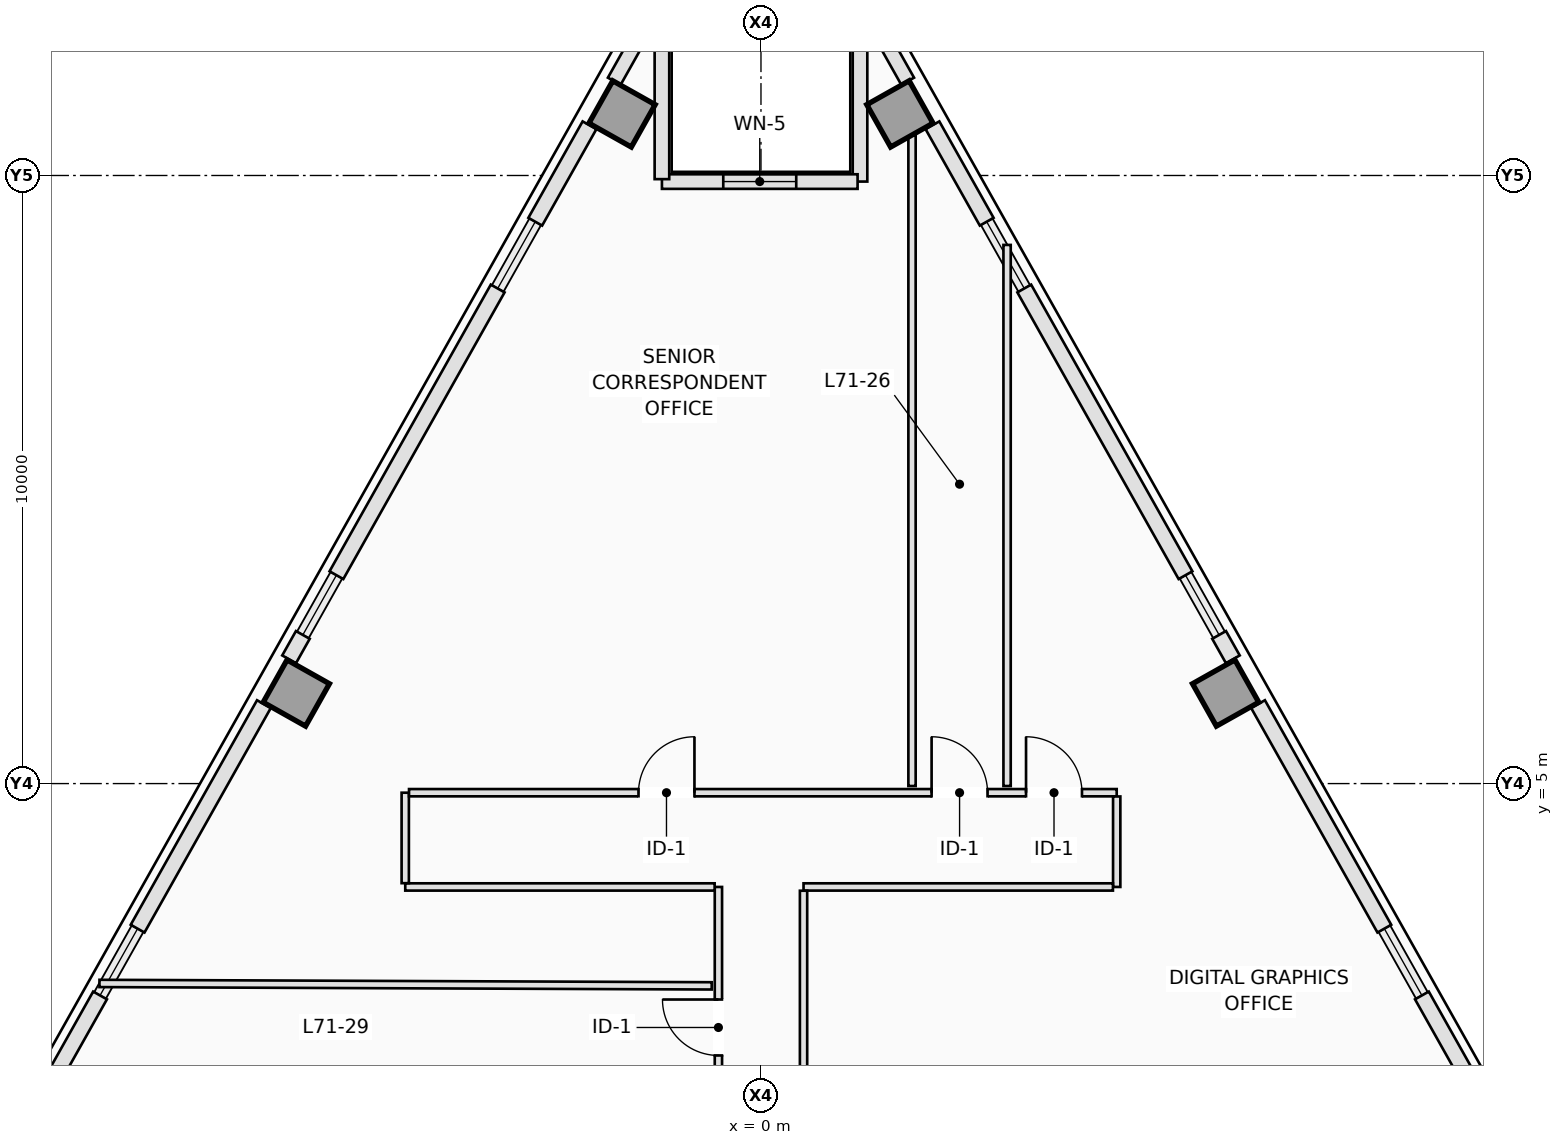
"""IFC4 building model, lengths in metres.
Left out: names, types, materials, properties, quantities, classifications, styles, units other than length and angle.
Written with IfcOpenShell. Run it as: python <this file> out.ifc"""

import sys

from ifc_helpers import new_model, si_unit, direction, frame, frame_2d, origin, origin_2d, place, context, subcontext, project, spatial, rectangle, extrude, element, fill, save


model = new_model("IFC4")
c1 = context("Model", 3, precision=1e-05, world=origin(), true_north=direction((0.0, 1.0)))
c2 = subcontext(c1, "Body", "Model", "MODEL_VIEW")
j1 = project(units=[si_unit("LENGTHUNIT", "METRE"), si_unit("PLANEANGLEUNIT", "RADIAN")], contexts=[c1])
p1 = place(None, origin())
s1 = spatial("IfcSite", under=j1, at=p1, CompositionType="ELEMENT")
p2 = place(p1, origin())
s2 = spatial("IfcBuilding", under=s1, at=p2, CompositionType="ELEMENT")
p3 = place(p2, frame((0.0, 0.0, 256.9)))
s3 = spatial("IfcBuildingStorey", under=s2, at=p3, CompositionType="ELEMENT", Elevation=256.9)
for number, where, z_axis, x_axis in (
    (1, (7.642, 6.489, 0.0), (0.0, 0.0, 1.0), (0.872, 0.49, 0.0)),
    (2, (2.285, 16.012, 0.0), (0.0, 0.0, 1.0), (0.872, 0.49, 0.0)),
    (3, (-2.285, 16.012, 0.0), (0.0, 0.0, 1.0), (-0.872, 0.49, 0.0)),
    (4, (-7.642, 6.489, 0.0), (0.0, 0.0, 1.0), (-0.872, 0.49, 0.0)),
):
    element("IfcColumn", number, at=place(p3, frame(where, z_axis=z_axis, x_axis=x_axis)), inside=s3, PredefinedType="COLUMN", context=c2, shape_type="SweptSolid", body=[
        extrude(rectangle(XDim=0.8, YDim=0.8, at=origin_2d()), origin(), (0.0, 0.0, 1.0), 3.5),
    ])
p4 = place(p3, frame((1.95, 17.373, 0.0), z_axis=(0.0, 0.0, 1.0), x_axis=(0.490199895283, -0.871610040479, 0.0)))
e5 = element("IfcWall", 5, at=p4, inside=s3, PredefinedType="STANDARD", context=c2, shape_type="SweptSolid", body=[
    extrude(rectangle(XDim=0.945, YDim=0.24, at=frame_2d((0.472, 0.0))), origin(), (0.0, 0.0, 1.0), 3.25),
])
p5 = place(p3, frame((2.82, 15.826, 0.0), z_axis=(0.0, 0.0, 1.0), x_axis=(0.490261239633, -0.871575537125, 0.0)))
e6 = element("IfcWall", 6, at=p5, inside=s3, PredefinedType="STANDARD", context=c2, shape_type="SweptSolid", body=[
    extrude(rectangle(XDim=1.82, YDim=0.26, at=frame_2d((0.91, 0.0))), origin(), (0.0, 0.0, 1.0), 3.25),
])
p6 = place(p3, frame((4.33, 13.142, 0.0), z_axis=(0.0, 0.0, 1.0), x_axis=(0.490265525523, -0.871573126297, 0.0)))
e7 = element("IfcWall", 7, at=p6, inside=s3, PredefinedType="STANDARD", context=c2, shape_type="SweptSolid", body=[
    extrude(rectangle(XDim=5.409, YDim=0.26, at=frame_2d((2.705, 0.0))), origin(), (0.0, 0.0, 1.0), 3.25),
])
p7 = place(p3, frame((7.534, 7.445, 0.0), z_axis=(0.0, 0.0, 1.0), x_axis=(0.490412424957, -0.871490478116, 0.0)))
e8 = element("IfcWall", 8, at=p7, inside=s3, PredefinedType="STANDARD", context=c2, shape_type="SweptSolid", body=[
    extrude(rectangle(XDim=0.46, YDim=0.26, at=frame_2d((0.23, 0.0))), origin(), (0.0, 0.0, 1.0), 3.25),
])
p8 = place(p3, frame((8.174, 6.307, 0.0), z_axis=(0.0, 0.0, 1.0), x_axis=(0.490269447258, -0.871570920284, 0.0)))
e9 = element("IfcWall", 9, at=p8, inside=s3, PredefinedType="STANDARD", context=c2, shape_type="SweptSolid", body=[
    extrude(rectangle(XDim=4.237, YDim=0.26, at=frame_2d((2.118, 0.0))), origin(), (0.0, 0.0, 1.0), 3.25),
])
p9 = place(p3, frame((10.869, 1.516, 0.0), z_axis=(0.0, 0.0, 1.0), x_axis=(0.490244825075, -0.871584770109, 0.0)))
e10 = element("IfcWall", 10, at=p9, inside=s3, PredefinedType="STANDARD", context=c2, shape_type="SweptSolid", body=[
    extrude(rectangle(XDim=4.237, YDim=0.26, at=frame_2d((2.119, 0.0))), origin(), (0.0, 0.0, 1.0), 3.25),
])
p10 = place(p3, frame((-2.413, 16.549, 0.0), z_axis=(0.0, 0.0, 1.0), x_axis=(0.490199895283, 0.871610040479, 0.0)))
e11 = element("IfcWall", 11, at=p10, inside=s3, PredefinedType="STANDARD", context=c2, shape_type="SweptSolid", body=[
    extrude(rectangle(XDim=0.945, YDim=0.24, at=frame_2d((0.472, 0.0))), origin(), (0.0, 0.0, 1.0), 3.25),
])
p11 = place(p3, frame((-7.76, 7.044, 0.0), z_axis=(0.0, 0.0, 1.0), x_axis=(0.490412424957, 0.871490478116, 0.0)))
e12 = element("IfcWall", 12, at=p11, inside=s3, PredefinedType="STANDARD", context=c2, shape_type="SweptSolid", body=[
    extrude(rectangle(XDim=0.46, YDim=0.26, at=frame_2d((0.23, 0.0))), origin(), (0.0, 0.0, 1.0), 3.25),
])
p12 = place(p3, frame((-6.982, 8.427, 0.0), z_axis=(0.0, 0.0, 1.0), x_axis=(0.490265525523, 0.871573126297, 0.0)))
e13 = element("IfcWall", 13, at=p12, inside=s3, PredefinedType="STANDARD", context=c2, shape_type="SweptSolid", body=[
    extrude(rectangle(XDim=5.409, YDim=0.26, at=frame_2d((2.705, 0.0))), origin(), (0.0, 0.0, 1.0), 3.25),
])
p13 = place(p3, frame((-3.712, 14.24, 0.0), z_axis=(0.0, 0.0, 1.0), x_axis=(0.490261239633, 0.871575537125, 0.0)))
e14 = element("IfcWall", 14, at=p13, inside=s3, PredefinedType="STANDARD", context=c2, shape_type="SweptSolid", body=[
    extrude(rectangle(XDim=1.82, YDim=0.26, at=frame_2d((0.91, 0.0))), origin(), (0.0, 0.0, 1.0), 3.25),
])
p14 = place(p3, frame((-12.946, -2.177, 0.0), z_axis=(0.0, 0.0, 1.0), x_axis=(0.490244825075, 0.871584770109, 0.0)))
e15 = element("IfcWall", 15, at=p14, inside=s3, PredefinedType="STANDARD", context=c2, shape_type="SweptSolid", body=[
    extrude(rectangle(XDim=4.237, YDim=0.26, at=frame_2d((2.119, 0.0))), origin(), (0.0, 0.0, 1.0), 3.25),
])
p15 = place(p3, frame((-10.251, 2.615, 0.0), z_axis=(0.0, 0.0, 1.0), x_axis=(0.490269447258, 0.871570920284, 0.0)))
e16 = element("IfcWall", 16, at=p15, inside=s3, PredefinedType="STANDARD", context=c2, shape_type="SweptSolid", body=[
    extrude(rectangle(XDim=4.237, YDim=0.26, at=frame_2d((2.118, 0.0))), origin(), (0.0, 0.0, 1.0), 3.25),
])
p16 = place(p3, frame((1.629, 17.4, 0.0), z_axis=(0.0, 0.0, 1.0), x_axis=(0.0, -1.0, 0.0)))
e17 = element("IfcWall", 17, at=p16, inside=s3, PredefinedType="STANDARD", context=c2, shape_type="SweptSolid", body=[
    extrude(rectangle(XDim=2.5, YDim=0.24, at=frame_2d((1.25, 0.0))), origin(), (0.0, 0.0, 1.0), 3.25),
])
p17 = place(p3, frame((1.589, 14.9, 0.0), z_axis=(0.0, 0.0, 1.0), x_axis=(-1.0, 0.0, 0.0)))
e18 = element("IfcWall", 18, at=p17, inside=s3, PredefinedType="STANDARD", context=c2, shape_type="SweptSolid", body=[
    extrude(rectangle(XDim=3.218, YDim=0.24, at=frame_2d((1.609, 0.0))), origin(), (0.0, 0.0, 1.0), 3.25),
])
p18 = place(p17, frame((1.009, 0.0, 0.9)))
e19 = element("IfcOpeningElement", 19, at=p18, cuts=e18, PredefinedType="OPENING", context=c2, shape_type="SweptSolid", body=[
    extrude(rectangle(XDim=1.2, YDim=1.8, at=frame_2d((0.6, 0.9))), frame((0.0, 0.13, 0.0), z_axis=(0.0, -1.0, 0.0), x_axis=(1.0, 0.0, 0.0)), (0.0, 0.0, 1.0), 0.26),
])
p19 = place(p3, frame((-1.629, 14.94, 0.0), z_axis=(0.0, 0.0, 1.0), x_axis=(0.0, 1.0, 0.0)))
e20 = element("IfcWall", 20, at=p19, inside=s3, PredefinedType="STANDARD", context=c2, shape_type="SweptSolid", body=[
    extrude(rectangle(XDim=2.46, YDim=0.24, at=frame_2d((1.23, 0.0))), origin(), (0.0, 0.0, 1.0), 3.25),
])
p20 = place(p3, frame((-0.7, -2.668, 0.0), z_axis=(0.0, 0.0, 1.0), x_axis=(0.0, 1.0, 0.0)))
e21 = element("IfcWall", 21, at=p20, inside=s3, PredefinedType="PARTITIONING", context=c2, shape_type="SweptSolid", body=[
    extrude(rectangle(XDim=5.968, YDim=0.12, at=frame_2d((2.984, 0.0))), origin(), (0.0, 0.0, 1.0), 3.25),
])
p21 = place(p20, frame((3.197, 0.0, 0.0)))
e22 = element("IfcOpeningElement", 22, at=p21, cuts=e21, PredefinedType="OPENING", context=c2, shape_type="SweptSolid", body=[
    extrude(rectangle(XDim=0.92, YDim=2.12, at=frame_2d((0.46, 1.06))), frame((0.0, 0.07, 0.0), z_axis=(0.0, -1.0, 0.0), x_axis=(1.0, 0.0, 0.0)), (0.0, 0.0, 1.0), 0.14),
])
p22 = place(p3, frame((-0.762, 3.3, 0.0), z_axis=(0.0, 0.0, 1.0), x_axis=(-1.0, 0.0, 0.0)))
e23 = element("IfcWall", 23, at=p22, inside=s3, PredefinedType="PARTITIONING", context=c2, shape_type="SweptSolid", body=[
    extrude(rectangle(XDim=5.088, YDim=0.12, at=frame_2d((2.544, 0.0))), origin(), (0.0, 0.0, 1.0), 3.25),
])
p23 = place(p3, frame((-5.85, 3.362, 0.0), z_axis=(0.0, 0.0, 1.0), x_axis=(0.0, 1.0, 0.0)))
e24 = element("IfcWall", 24, at=p23, inside=s3, PredefinedType="PARTITIONING", context=c2, shape_type="SweptSolid", body=[
    extrude(rectangle(XDim=1.488, YDim=0.12, at=frame_2d((0.744, 0.0))), origin(), (0.0, 0.0, 1.0), 3.25),
])
p24 = place(p3, frame((-5.788, 4.85, 0.0), z_axis=(0.0, 0.0, 1.0), x_axis=(1.0, 0.0, 0.0)))
e25 = element("IfcWall", 25, at=p24, inside=s3, PredefinedType="PARTITIONING", context=c2, shape_type="SweptSolid", body=[
    extrude(rectangle(XDim=11.638, YDim=0.12, at=frame_2d((5.819, 0.0))), origin(), (0.0, 0.0, 1.0), 2.943),
])
p25 = place(p24, frame((8.594, 0.0, 0.0)))
e26 = element("IfcOpeningElement", 26, at=p25, cuts=e25, PredefinedType="OPENING", context=c2, shape_type="SweptSolid", body=[
    extrude(rectangle(XDim=0.92, YDim=2.12, at=frame_2d((0.46, 1.06))), frame((0.0, 0.07, 0.0), z_axis=(0.0, -1.0, 0.0), x_axis=(1.0, 0.0, 0.0)), (0.0, 0.0, 1.0), 0.14),
])
p26 = place(p24, frame((3.774, 0.0, 0.0)))
e27 = element("IfcOpeningElement", 27, at=p26, cuts=e25, PredefinedType="OPENING", context=c2, shape_type="SweptSolid", body=[
    extrude(rectangle(XDim=0.92, YDim=2.12, at=frame_2d((0.46, 1.06))), frame((0.0, 0.07, 0.0), z_axis=(0.0, -1.0, 0.0), x_axis=(1.0, 0.0, 0.0)), (0.0, 0.0, 1.0), 0.14),
])
p27 = place(p24, frame((10.147, 0.0, 0.0)))
e28 = element("IfcOpeningElement", 28, at=p27, cuts=e25, PredefinedType="OPENING", context=c2, shape_type="SweptSolid", body=[
    extrude(rectangle(XDim=0.92, YDim=2.12, at=frame_2d((0.46, 1.06))), frame((0.0, 0.07, 0.0), z_axis=(0.0, -1.0, 0.0), x_axis=(1.0, 0.0, 0.0)), (0.0, 0.0, 1.0), 0.14),
])
p28 = place(p3, frame((5.85, 4.788, 0.0), z_axis=(0.0, 0.0, 1.0), x_axis=(0.0, -1.0, 0.0)))
e29 = element("IfcWall", 29, at=p28, inside=s3, PredefinedType="PARTITIONING", context=c2, shape_type="SweptSolid", body=[
    extrude(rectangle(XDim=1.488, YDim=0.12, at=frame_2d((0.744, 0.0))), origin(), (0.0, 0.0, 1.0), 3.25),
])
p29 = place(p3, frame((5.788, 3.3, 0.0), z_axis=(0.0, 0.0, 1.0), x_axis=(-1.0, 0.0, 0.0)))
e30 = element("IfcWall", 30, at=p29, inside=s3, PredefinedType="PARTITIONING", context=c2, shape_type="SweptSolid", body=[
    extrude(rectangle(XDim=5.088, YDim=0.12, at=frame_2d((2.544, 0.0))), origin(), (0.0, 0.0, 1.0), 3.25),
])
p30 = place(p3, frame((0.7, 3.238, 0.0), z_axis=(0.0, 0.0, 1.0), x_axis=(0.0, -1.0, 0.0)))
e31 = element("IfcWall", 31, at=p30, inside=s3, PredefinedType="PARTITIONING", context=c2, shape_type="SweptSolid", body=[
    extrude(rectangle(XDim=5.968, YDim=0.12, at=frame_2d((2.984, 0.0))), origin(), (0.0, 0.0, 1.0), 3.25),
])
p31 = place(p3, frame((2.484, 4.96, 0.0), z_axis=(0.0, 0.0, 1.0), x_axis=(0.0, 1.0, 0.0)))
e32 = element("IfcWall", 32, at=p31, inside=s3, PredefinedType="PARTITIONING", context=c2, shape_type="SweptSolid", body=[
    extrude(rectangle(XDim=10.703, YDim=0.12, at=frame_2d((5.352, 0.0))), origin(), (0.0, 0.0, 1.0), 2.79),
])
p32 = place(p3, frame((4.047, 13.858, 0.0), z_axis=(0.0, 0.0, 1.0), x_axis=(0.0, -1.0, 0.0)))
e33 = element("IfcWall", 33, at=p32, inside=s3, PredefinedType="PARTITIONING", context=c2, shape_type="SweptSolid", body=[
    extrude(rectangle(XDim=8.898, YDim=0.12, at=frame_2d((4.449, 0.0))), origin(), (0.0, 0.0, 1.0), 3.25),
])
p33 = place(p3, frame((-0.81, 1.673, 0.0), z_axis=(0.0, 0.0, 1.0), x_axis=(-0.999992189826, 0.003952250787, 0.0)))
e34 = element("IfcWall", 34, at=p33, inside=s3, PredefinedType="PARTITIONING", context=c2, shape_type="SweptSolid", body=[
    extrude(rectangle(XDim=10.069, YDim=0.12, at=frame_2d((5.034, 0.0))), origin(), (0.0, 0.0, 1.0), 3.25),
])
p34 = place(p18, origin())
e35 = element("IfcWindow", 35, at=p34, inside=s3, PartitioningType="SINGLE_PANEL", PredefinedType="WINDOW", context=c2, shape_type="SweptSolid", body=[
    extrude(rectangle(XDim=1.2, YDim=1.8, at=frame_2d((0.6, 0.9))), frame((0.0, 0.03, 0.0), z_axis=(0.0, -1.0, 0.0), x_axis=(1.0, 0.0, 0.0)), (0.0, 0.0, 1.0), 0.06),
])
fill(e19, e35)
p35 = place(p25, origin())
e36 = element("IfcDoor", 36, at=p35, inside=s3, OperationType="SINGLE_SWING_LEFT", PredefinedType="DOOR", context=c2, shape_type="SweptSolid", body=[
    extrude(rectangle(XDim=0.92, YDim=2.12, at=frame_2d((0.46, 1.06))), frame((0.0, 0.025, 0.0), z_axis=(0.0, -1.0, 0.0), x_axis=(1.0, 0.0, 0.0)), (0.0, 0.0, 1.0), 0.05),
])
fill(e26, e36)
p36 = place(p26, origin())
e37 = element("IfcDoor", 37, at=p36, inside=s3, OperationType="SINGLE_SWING_RIGHT", PredefinedType="DOOR", context=c2, shape_type="SweptSolid", body=[
    extrude(rectangle(XDim=0.92, YDim=2.12, at=frame_2d((0.46, 1.06))), frame((0.0, 0.025, 0.0), z_axis=(0.0, -1.0, 0.0), x_axis=(1.0, 0.0, 0.0)), (0.0, 0.0, 1.0), 0.05),
])
fill(e27, e37)
p37 = place(p27, origin())
e38 = element("IfcDoor", 38, at=p37, inside=s3, OperationType="SINGLE_SWING_LEFT", PredefinedType="DOOR", context=c2, shape_type="SweptSolid", body=[
    extrude(rectangle(XDim=0.92, YDim=2.12, at=frame_2d((0.46, 1.06))), frame((0.0, 0.025, 0.0), z_axis=(0.0, -1.0, 0.0), x_axis=(1.0, 0.0, 0.0)), (0.0, 0.0, 1.0), 0.05),
])
fill(e28, e38)
p38 = place(p21, origin())
e39 = element("IfcDoor", 39, at=p38, inside=s3, OperationType="SINGLE_SWING_RIGHT", PredefinedType="DOOR", context=c2, shape_type="SweptSolid", body=[
    extrude(rectangle(XDim=0.92, YDim=2.12, at=frame_2d((0.46, 1.06))), frame((0.0, 0.025, 0.0), z_axis=(0.0, -1.0, 0.0), x_axis=(1.0, 0.0, 0.0)), (0.0, 0.0, 1.0), 0.05),
])
fill(e22, e39)
save(model, sys.argv[1])
